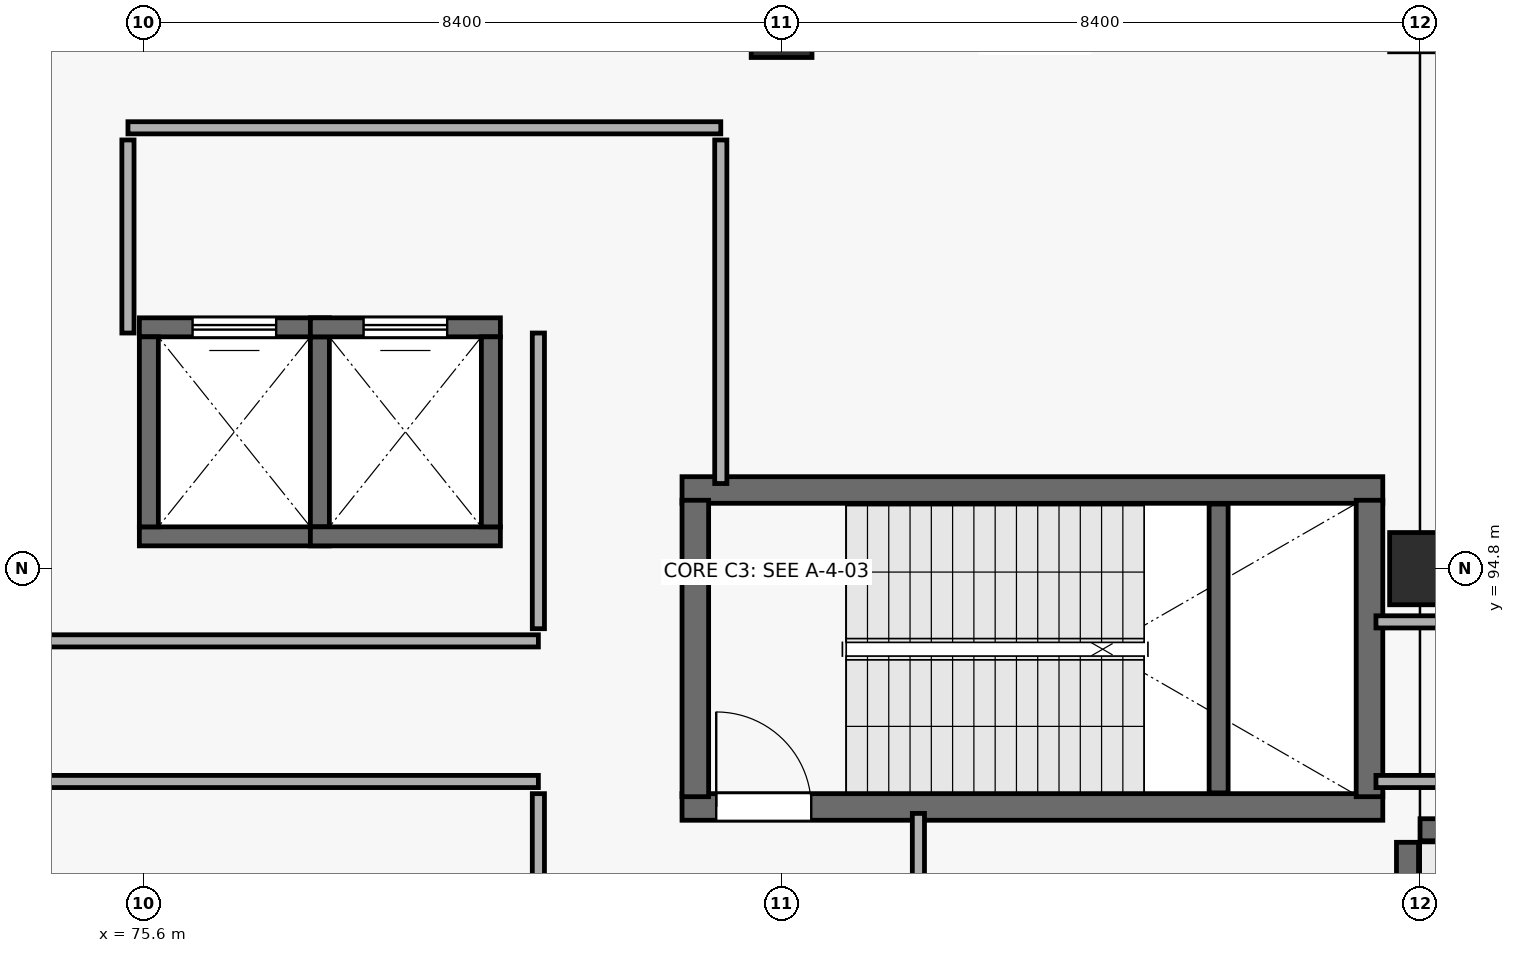
"""IFC4 building model, lengths in metres.
Left out: names, types, materials, properties, quantities, classifications, styles, units other than length and angle.
Written with IfcOpenShell. Run it as: python <this file> out.ifc"""

import sys

from ifc_helpers import new_model, si_unit, direction, frame, frame_2d, origin, origin_2d, place, context, subcontext, project, spatial, rectangle, extrude, element, fill, save


model = new_model("IFC4")
c1 = context("Model", 3, precision=1e-05, world=origin(), true_north=direction((0.0, 1.0)))
c2 = subcontext(c1, "Body", "Model", "MODEL_VIEW")
j1 = project(units=[si_unit("LENGTHUNIT", "METRE"), si_unit("PLANEANGLEUNIT", "RADIAN")], contexts=[c1])
p1 = place(None, origin())
s1 = spatial("IfcSite", under=j1, at=p1, CompositionType="ELEMENT")
p2 = place(p1, origin())
s2 = spatial("IfcBuilding", under=s1, at=p2, CompositionType="ELEMENT")
p3 = place(p2, origin())
s3 = spatial("IfcBuildingStorey", under=s2, at=p3, CompositionType="ELEMENT", Elevation=0.0)
for number, where, z_axis, x_axis in (
    (1, (84.0, 102.0, 0.0), (0.0, 0.0, 1.0), (1.0, 0.0, 0.0)),
    (2, (92.4, 94.8, 0.0), (0.0, 0.0, 1.0), (1.0, 0.0, 0.0)),
):
    element("IfcColumn", number, at=place(p3, frame(where, z_axis=z_axis, x_axis=x_axis)), inside=s3, PredefinedType="COLUMN", context=c2, shape_type="SweptSolid", body=[
        extrude(rectangle(XDim=0.8, YDim=0.95, at=origin_2d()), origin(), (0.0, 0.0, 1.0), 5.4),
    ])
p4 = place(p3, frame((92.4, 102.0, 0.0), z_axis=(0.0, 0.0, 1.0), x_axis=(1.0, 0.0, 0.0)))
e3 = element("IfcColumn", 3, at=p4, inside=s3, PredefinedType="COLUMN", context=c2, shape_type="SweptSolid", body=[
    extrude(rectangle(XDim=0.8, YDim=0.8, at=origin_2d()), origin(), (0.0, 0.0, 1.0), 5.4),
])
p5 = place(p3, frame((93.7, 91.365, 0.0), z_axis=(0.0, 0.0, 1.0), x_axis=(-1.0, 0.0, 0.0)))
e4 = element("IfcWall", 4, at=p5, inside=s3, PredefinedType="SOLIDWALL", context=c2, shape_type="SweptSolid", body=[
    extrude(rectangle(XDim=1.3, YDim=0.29, at=frame_2d((0.65, 0.0))), origin(), (0.0, 0.0, 1.0), 5.12),
])
p6 = place(p3, frame((92.235, 91.2, 0.0), z_axis=(0.0, 0.0, 1.0), x_axis=(0.0, -1.0, 0.0)))
e5 = element("IfcWall", 5, at=p6, inside=s3, PredefinedType="SOLIDWALL", context=c2, shape_type="SweptSolid", body=[
    extrude(rectangle(XDim=6.0, YDim=0.29, at=frame_2d((3.0, 0.0))), origin(), (0.0, 0.0, 1.0), 5.12),
])
p7 = place(p3, frame((82.69, 91.665, 0.0), z_axis=(0.0, 0.0, 1.0), x_axis=(1.0, 0.0, 0.0)))
e6 = element("IfcWall", 6, at=p7, inside=s3, PredefinedType="SHEAR", context=c2, shape_type="SweptSolid", body=[
    extrude(rectangle(XDim=9.22, YDim=0.35, at=frame_2d((4.61, 0.0))), origin(), (0.0, 0.0, 1.0), 5.12),
])
p8 = place(p7, frame((0.45, 0.0, 0.0)))
e7 = element("IfcOpeningElement", 7, at=p8, cuts=e6, PredefinedType="OPENING", context=c2, shape_type="SweptSolid", body=[
    extrude(rectangle(XDim=1.25, YDim=2.2, at=frame_2d((0.625, 1.1))), frame((0.0, 0.185, 0.0), z_axis=(0.0, -1.0, 0.0), x_axis=(1.0, 0.0, 0.0)), (0.0, 0.0, 1.0), 0.37),
])
p9 = place(p3, frame((91.91, 95.835, 0.0), z_axis=(0.0, 0.0, 1.0), x_axis=(-1.0, 0.0, 0.0)))
e8 = element("IfcWall", 8, at=p9, inside=s3, PredefinedType="SHEAR", context=c2, shape_type="SweptSolid", body=[
    extrude(rectangle(XDim=9.22, YDim=0.35, at=frame_2d((4.61, 0.0))), origin(), (0.0, 0.0, 1.0), 5.12),
])
for number, where, z_axis, x_axis in (
    (9, (82.865, 91.8, 0.0), (0.0, 0.0, 1.0), (0.0, 1.0, 0.0)),
    (10, (91.735, 95.7, 0.0), (0.0, 0.0, 1.0), (0.0, -1.0, 0.0)),
):
    element("IfcWall", number, at=place(p3, frame(where, z_axis=z_axis, x_axis=x_axis)), inside=s3, PredefinedType="SHEAR", context=c2, shape_type="SweptSolid", body=[
        extrude(rectangle(XDim=3.9, YDim=0.35, at=frame_2d((1.95, 0.0))), origin(), (0.0, 0.0, 1.0), 5.12),
    ])
p10 = place(p3, frame((89.75, 91.85, 0.0), z_axis=(0.0, 0.0, 1.0), x_axis=(0.0, 1.0, 0.0)))
e11 = element("IfcWall", 11, at=p10, inside=s3, PredefinedType="SHEAR", context=c2, shape_type="SweptSolid", body=[
    extrude(rectangle(XDim=3.8, YDim=0.25, at=frame_2d((1.9, 0.0))), origin(), (0.0, 0.0, 1.0), 2.52),
])
p11 = place(p3, frame((75.55, 95.225, 0.0), z_axis=(0.0, 0.0, 1.0), x_axis=(1.0, 0.0, 0.0)))
e12 = element("IfcWall", 12, at=p11, inside=s3, PredefinedType="SHEAR", context=c2, shape_type="SweptSolid", body=[
    extrude(rectangle(XDim=2.5, YDim=0.25, at=frame_2d((1.25, 0.0))), origin(), (0.0, 0.0, 1.0), 5.12),
])
p12 = place(p3, frame((78.05, 97.975, 0.0), z_axis=(0.0, 0.0, 1.0), x_axis=(-1.0, 0.0, 0.0)))
e13 = element("IfcWall", 13, at=p12, inside=s3, PredefinedType="SHEAR", context=c2, shape_type="SweptSolid", body=[
    extrude(rectangle(XDim=2.5, YDim=0.25, at=frame_2d((1.25, 0.0))), origin(), (0.0, 0.0, 1.0), 5.12),
])
p13 = place(p12, frame((0.7, 0.0, 0.0)))
e14 = element("IfcOpeningElement", 14, at=p13, cuts=e13, PredefinedType="OPENING", context=c2, shape_type="SweptSolid", body=[
    extrude(rectangle(XDim=1.1, YDim=2.2, at=frame_2d((0.55, 1.1))), frame((0.0, 0.135, 0.0), z_axis=(0.0, -1.0, 0.0), x_axis=(1.0, 0.0, 0.0)), (0.0, 0.0, 1.0), 0.27),
])
for number, where, z_axis, x_axis in (
    (15, (75.675, 95.35, 0.0), (0.0, 0.0, 1.0), (0.0, 1.0, 0.0)),
    (16, (77.925, 97.85, 0.0), (0.0, 0.0, 1.0), (0.0, -1.0, 0.0)),
    (17, (77.8, 95.225, 0.0), (0.0, 0.0, 1.0), (1.0, 0.0, 0.0)),
):
    element("IfcWall", number, at=place(p3, frame(where, z_axis=z_axis, x_axis=x_axis)), inside=s3, PredefinedType="SHEAR", context=c2, shape_type="SweptSolid", body=[
        extrude(rectangle(XDim=2.5, YDim=0.25, at=frame_2d((1.25, 0.0))), origin(), (0.0, 0.0, 1.0), 5.12),
    ])
p14 = place(p3, frame((80.3, 97.975, 0.0), z_axis=(0.0, 0.0, 1.0), x_axis=(-1.0, 0.0, 0.0)))
e18 = element("IfcWall", 18, at=p14, inside=s3, PredefinedType="SHEAR", context=c2, shape_type="SweptSolid", body=[
    extrude(rectangle(XDim=2.5, YDim=0.25, at=frame_2d((1.25, 0.0))), origin(), (0.0, 0.0, 1.0), 5.12),
])
p15 = place(p14, frame((0.7, 0.0, 0.0)))
e19 = element("IfcOpeningElement", 19, at=p15, cuts=e18, PredefinedType="OPENING", context=c2, shape_type="SweptSolid", body=[
    extrude(rectangle(XDim=1.1, YDim=2.2, at=frame_2d((0.55, 1.1))), frame((0.0, 0.135, 0.0), z_axis=(0.0, -1.0, 0.0), x_axis=(1.0, 0.0, 0.0)), (0.0, 0.0, 1.0), 0.27),
])
p16 = place(p3, frame((80.175, 97.85, 0.0), z_axis=(0.0, 0.0, 1.0), x_axis=(0.0, -1.0, 0.0)))
e20 = element("IfcWall", 20, at=p16, inside=s3, PredefinedType="SHEAR", context=c2, shape_type="SweptSolid", body=[
    extrude(rectangle(XDim=2.5, YDim=0.25, at=frame_2d((1.25, 0.0))), origin(), (0.0, 0.0, 1.0), 5.12),
])
p17 = place(p3, frame((91.82, 92.0, 0.0), z_axis=(0.0, 0.0, 1.0), x_axis=(1.0, 0.0, 0.0)))
e21 = element("IfcWall", 21, at=p17, inside=s3, PredefinedType="PARTITIONING", context=c2, shape_type="SweptSolid", body=[
    extrude(rectangle(XDim=28.48, YDim=0.16, at=frame_2d((14.24, 0.0))), origin(), (0.0, 0.0, 1.0), 5.12),
])
p18 = place(p17, frame((13.42, 0.0, 0.0)))
e22 = element("IfcOpeningElement", 22, at=p18, cuts=e21, PredefinedType="OPENING", context=c2, shape_type="SweptSolid", body=[
    extrude(rectangle(XDim=1.64, YDim=2.42, at=frame_2d((0.82, 1.21))), frame((0.0, 0.09, 0.0), z_axis=(0.0, -1.0, 0.0), x_axis=(1.0, 0.0, 0.0)), (0.0, 0.0, 1.0), 0.18),
])
p19 = place(p3, frame((109.55, 94.1, 0.0), z_axis=(0.0, 0.0, 1.0), x_axis=(-1.0, 0.0, 0.0)))
e23 = element("IfcWall", 23, at=p19, inside=s3, PredefinedType="PARTITIONING", context=c2, shape_type="SweptSolid", body=[
    extrude(rectangle(XDim=17.73, YDim=0.16, at=frame_2d((8.865, 0.0))), origin(), (0.0, 0.0, 1.0), 5.12),
])
p20 = place(p19, frame((5.917, 0.0, 0.0)))
e24 = element("IfcOpeningElement", 24, at=p20, cuts=e23, PredefinedType="OPENING", context=c2, shape_type="SweptSolid", body=[
    extrude(rectangle(XDim=1.64, YDim=2.42, at=frame_2d((0.82, 1.21))), frame((0.0, 0.09, 0.0), z_axis=(0.0, -1.0, 0.0), x_axis=(1.0, 0.0, 0.0)), (0.0, 0.0, 1.0), 0.18),
])
p21 = place(p3, frame((66.56, 92.0, 0.0), z_axis=(0.0, 0.0, 1.0), x_axis=(1.0, 0.0, 0.0)))
e25 = element("IfcWall", 25, at=p21, inside=s3, PredefinedType="PARTITIONING", context=c2, shape_type="SweptSolid", body=[
    extrude(rectangle(XDim=14.24, YDim=0.16, at=frame_2d((7.12, 0.0))), origin(), (0.0, 0.0, 1.0), 5.12),
])
p22 = place(p3, frame((80.8, 93.85, 0.0), z_axis=(0.0, 0.0, 1.0), x_axis=(-1.0, 0.0, 0.0)))
e26 = element("IfcWall", 26, at=p22, inside=s3, PredefinedType="PARTITIONING", context=c2, shape_type="SweptSolid", body=[
    extrude(rectangle(XDim=14.3, YDim=0.16, at=frame_2d((7.15, 0.0))), origin(), (0.0, 0.0, 1.0), 5.12),
])
p23 = place(p3, frame((83.2, 100.6, 0.0), z_axis=(0.0, 0.0, 1.0), x_axis=(-1.0, 0.0, 0.0)))
e27 = element("IfcWall", 27, at=p23, inside=s3, PredefinedType="PARTITIONING", context=c2, shape_type="SweptSolid", body=[
    extrude(rectangle(XDim=7.8, YDim=0.16, at=frame_2d((3.9, 0.0))), origin(), (0.0, 0.0, 1.0), 5.12),
])
p24 = place(p3, frame((83.2, 95.92, 0.0), z_axis=(0.0, 0.0, 1.0), x_axis=(0.0, 1.0, 0.0)))
e28 = element("IfcWall", 28, at=p24, inside=s3, PredefinedType="PARTITIONING", context=c2, shape_type="SweptSolid", body=[
    extrude(rectangle(XDim=4.52, YDim=0.16, at=frame_2d((2.26, 0.0))), origin(), (0.0, 0.0, 1.0), 5.12),
])
p25 = place(p3, frame((80.8, 97.9, 0.0), z_axis=(0.0, 0.0, 1.0), x_axis=(0.0, -1.0, 0.0)))
e29 = element("IfcWall", 29, at=p25, inside=s3, PredefinedType="PARTITIONING", context=c2, shape_type="SweptSolid", body=[
    extrude(rectangle(XDim=3.89, YDim=0.16, at=frame_2d((1.945, 0.0))), origin(), (0.0, 0.0, 1.0), 5.12),
])
p26 = place(p3, frame((80.8, 91.84, 0.0), z_axis=(0.0, 0.0, 1.0), x_axis=(0.0, -1.0, 0.0)))
e30 = element("IfcWall", 30, at=p26, inside=s3, PredefinedType="PARTITIONING", context=c2, shape_type="SweptSolid", body=[
    extrude(rectangle(XDim=2.48, YDim=0.16, at=frame_2d((1.24, 0.0))), origin(), (0.0, 0.0, 1.0), 5.12),
])
p27 = place(p3, frame((75.4, 100.44, 0.0), z_axis=(0.0, 0.0, 1.0), x_axis=(0.0, -1.0, 0.0)))
e31 = element("IfcWall", 31, at=p27, inside=s3, PredefinedType="PARTITIONING", context=c2, shape_type="SweptSolid", body=[
    extrude(rectangle(XDim=2.54, YDim=0.16, at=frame_2d((1.27, 0.0))), origin(), (0.0, 0.0, 1.0), 3.91),
])
p28 = place(p3, frame((85.8, 89.36, 0.0), z_axis=(0.0, 0.0, 1.0), x_axis=(0.0, 1.0, 0.0)))
e32 = element("IfcWall", 32, at=p28, inside=s3, PredefinedType="PARTITIONING", context=c2, shape_type="SweptSolid", body=[
    extrude(rectangle(XDim=2.22, YDim=0.16, at=frame_2d((1.11, 0.0))), origin(), (0.0, 0.0, 1.0), 5.12),
])
p29 = place(p8, origin())
e33 = element("IfcDoor", 33, at=p29, inside=s3, OperationType="SINGLE_SWING_LEFT", PredefinedType="DOOR", context=c2, shape_type="SweptSolid", body=[
    extrude(rectangle(XDim=1.25, YDim=2.2, at=frame_2d((0.625, 1.1))), frame((0.0, 0.025, 0.0), z_axis=(0.0, -1.0, 0.0), x_axis=(1.0, 0.0, 0.0)), (0.0, 0.0, 1.0), 0.05),
])
fill(e7, e33)
p30 = place(p13, origin())
e34 = element("IfcDoor", 34, at=p30, inside=s3, OperationType="SLIDING_TO_RIGHT", PredefinedType="DOOR", context=c2, shape_type="SweptSolid", body=[
    extrude(rectangle(XDim=1.1, YDim=2.2, at=frame_2d((0.55, 1.1))), frame((0.0, 0.025, 0.0), z_axis=(0.0, -1.0, 0.0), x_axis=(1.0, 0.0, 0.0)), (0.0, 0.0, 1.0), 0.05),
])
fill(e14, e34)
p31 = place(p15, origin())
e35 = element("IfcDoor", 35, at=p31, inside=s3, OperationType="SLIDING_TO_RIGHT", PredefinedType="DOOR", context=c2, shape_type="SweptSolid", body=[
    extrude(rectangle(XDim=1.1, YDim=2.2, at=frame_2d((0.55, 1.1))), frame((0.0, 0.025, 0.0), z_axis=(0.0, -1.0, 0.0), x_axis=(1.0, 0.0, 0.0)), (0.0, 0.0, 1.0), 0.05),
])
fill(e19, e35)
save(model, sys.argv[1])
